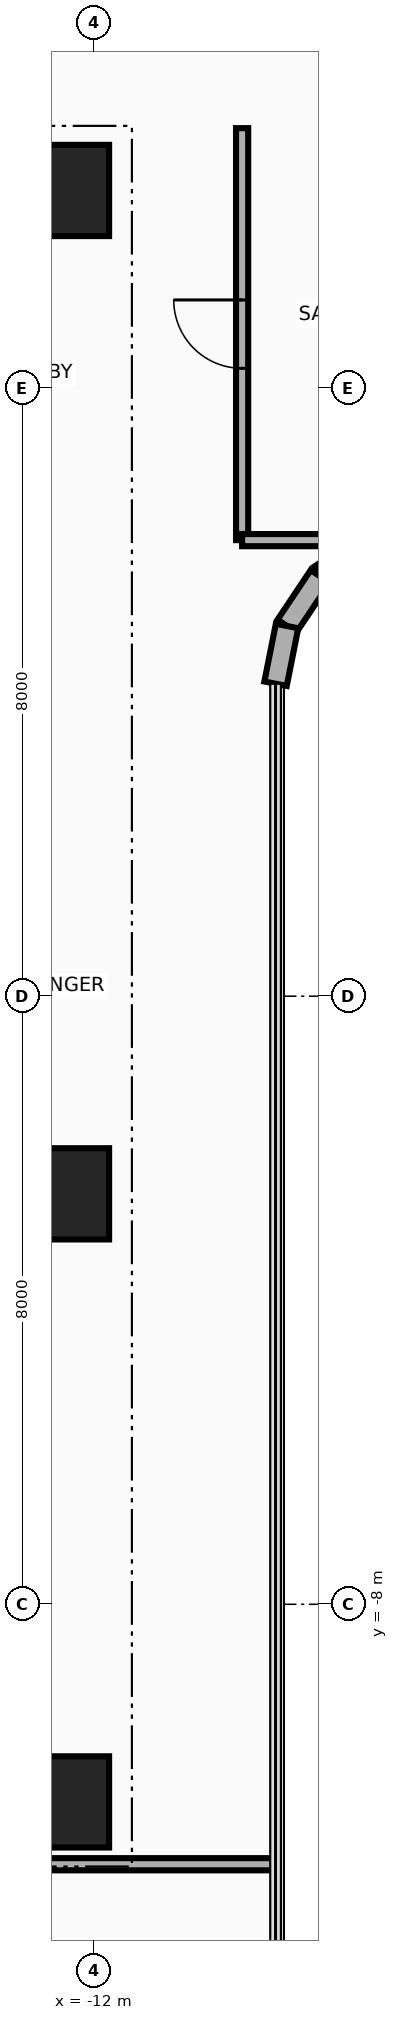
"""IFC4 building model, lengths in metres.
Left out: names, types, materials, properties, quantities, classifications, styles, units other than length and angle.
Written with IfcOpenShell. Run it as: python <this file> out.ifc"""

import sys

from ifc_helpers import new_model, si_unit, direction, frame, frame_2d, origin, origin_2d, place, context, subcontext, project, spatial, rectangle, extrude, source, transform, mapped, element, fill, save


model = new_model("IFC4")
c1 = context("Model", 3, precision=1e-05, world=origin(), true_north=direction((0.0, 1.0)))
c2 = subcontext(c1, "Body", "Model", "MODEL_VIEW")
j1 = project(units=[si_unit("LENGTHUNIT", "METRE"), si_unit("PLANEANGLEUNIT", "RADIAN")], contexts=[c1])
p1 = place(None, origin())
s1 = spatial("IfcSite", under=j1, at=p1, CompositionType="ELEMENT")
p2 = place(p1, origin())
s2 = spatial("IfcBuilding", under=s1, at=p2, CompositionType="ELEMENT")
p3 = place(p2, frame((0.0, 0.0, 161.2)))
s3 = spatial("IfcBuildingStorey", under=s2, at=p3, CompositionType="ELEMENT", Elevation=161.2)
for number, where, z_axis, x_axis in (
    (1, (-22.65, 10.8, 0.0), (0.0, 0.0, 1.0), (1.0, 0.0, 0.0)),
    (2, (-22.65, -10.8, 0.0), (0.0, 0.0, 1.0), (1.0, 0.0, 0.0)),
):
    element("IfcWall", number, at=place(p3, frame(where, z_axis=z_axis, x_axis=x_axis)), inside=s3, PredefinedType="SHEAR", context=c2, shape_type="SweptSolid", body=[
        extrude(rectangle(XDim=10.25, YDim=0.55, at=frame_2d((5.125, 0.0))), origin(), (0.0, 0.0, 1.0), 3.46),
    ])
m1 = source(origin(), c2, "Body", "SweptSolid", [
    extrude(rectangle(XDim=1.2, YDim=1.2, at=origin_2d()), origin(), (0.0, 0.0, 1.0), 3.7),
])
for number, where, z_axis, x_axis in (
    (3, (-12.4, -10.6, 0.0), (0.0, 0.0, 1.0), (1.0, 0.0, 0.0)),
    (4, (-12.4, -2.6, 0.0), (0.0, 0.0, 1.0), (1.0, 0.0, 0.0)),
    (5, (-12.4, 10.6, 0.0), (0.0, 0.0, 1.0), (1.0, 0.0, 0.0)),
):
    element("IfcColumn", number, at=place(p3, frame(where, z_axis=z_axis, x_axis=x_axis)), inside=s3, PredefinedType="COLUMN", context=c2, shape_type="MappedRepresentation", body=[
        mapped(m1, transform((0.0, 0.0, 0.0), x_axis=(1.0, 0.0, 0.0), y_axis=(0.0, 1.0, 0.0), z_axis=(0.0, 0.0, 1.0), scale=1.0)),
    ])
for number, where, z_axis, x_axis in (
    (6, (-8.37, 5.959, 0.0), (0.0, 0.0, 1.0), (-0.831, -0.556, 0.0)),
    (7, (-9.023, 5.523, 0.0), (0.0, 0.0, 1.0), (-0.556, -0.831, 0.0)),
):
    element("IfcWall", number, at=place(p3, frame(where, z_axis=z_axis, x_axis=x_axis)), inside=s3, PredefinedType="SOLIDWALL", context=c2, shape_type="SweptSolid", body=[
        extrude(rectangle(XDim=0.785, YDim=0.3, at=frame_2d((0.393, 0.0))), origin(), (0.0, 0.0, 1.0), 3.46),
    ])
p4 = place(p3, frame((-9.459, 4.87, 0.0), z_axis=(0.0, 0.0, 1.0), x_axis=(-0.195206365311, -0.98076219082, 0.0)))
e8 = element("IfcWall", 8, at=p4, inside=s3, PredefinedType="SOLIDWALL", context=c2, shape_type="SweptSolid", body=[
    extrude(rectangle(XDim=0.774, YDim=0.3, at=frame_2d((0.387, 0.0))), origin(), (0.0, 0.0, 1.0), 3.46),
])
p5 = place(p3, frame((-23.45, -11.42, 0.0), z_axis=(0.0, 0.0, 1.0), x_axis=(1.0, 0.0, 0.0)))
e9 = element("IfcWall", 9, at=p5, inside=s3, PredefinedType="PARTITIONING", context=c2, shape_type="SweptSolid", body=[
    extrude(rectangle(XDim=13.84, YDim=0.16, at=frame_2d((6.92, 0.0))), origin(), (0.0, 0.0, 1.0), 2.834),
])
p6 = place(p3, frame((-10.05, 6.0, 0.0), z_axis=(0.0, 0.0, 1.0), x_axis=(0.0, 1.0, 0.0)))
e10 = element("IfcWall", 10, at=p6, inside=s3, PredefinedType="PARTITIONING", context=c2, shape_type="SweptSolid", body=[
    extrude(rectangle(XDim=5.42, YDim=0.16, at=frame_2d((2.71, 0.0))), origin(), (0.0, 0.0, 1.0), 3.46),
])
p7 = place(p6, frame((2.26, 0.0, 0.0)))
e11 = element("IfcOpeningElement", 11, at=p7, cuts=e10, PredefinedType="OPENING", context=c2, shape_type="SweptSolid", body=[
    extrude(rectangle(XDim=0.9, YDim=2.1, at=frame_2d((0.45, 1.05))), frame((0.0, 0.095, 0.0), z_axis=(0.0, -1.0, 0.0), x_axis=(1.0, 0.0, 0.0)), (0.0, 0.0, 1.0), 0.19),
])
p8 = place(p3, frame((-10.05, 6.0, 0.0), z_axis=(0.0, 0.0, 1.0), x_axis=(1.0, 0.0, 0.0)))
e12 = element("IfcWall", 12, at=p8, inside=s3, PredefinedType="PARTITIONING", context=c2, shape_type="SweptSolid", body=[
    extrude(rectangle(XDim=1.516, YDim=0.16, at=frame_2d((0.758, 0.0))), origin(), (0.0, 0.0, 1.0), 3.46),
])
p9 = place(p7, origin())
e13 = element("IfcDoor", 13, at=p9, inside=s3, OperationType="SINGLE_SWING_RIGHT", PredefinedType="DOOR", context=c2, shape_type="SweptSolid", body=[
    extrude(rectangle(XDim=0.9, YDim=2.1, at=frame_2d((0.45, 1.05))), frame((0.0, 0.025, 0.0), z_axis=(0.0, -1.0, 0.0), x_axis=(1.0, 0.0, 0.0)), (0.0, 0.0, 1.0), 0.05),
])
fill(e11, e13)
save(model, sys.argv[1])
